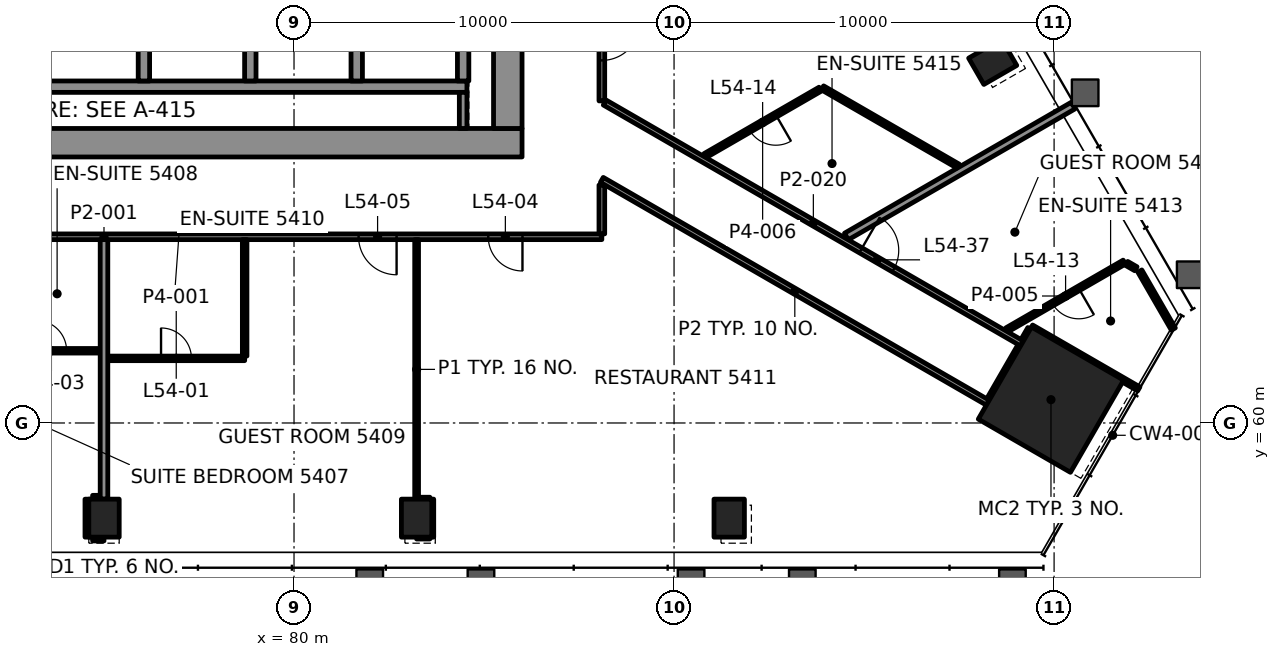
"""IFC4 building model, lengths in metres.
Left out: names, types, materials, properties, quantities, classifications, styles, units other than length and angle.
Written with IfcOpenShell. Run it as: python <this file> out.ifc"""

import sys

from ifc_helpers import new_model, si_unit, direction, frame, frame_2d, origin, origin_2d, place, context, subcontext, project, spatial, rectangle, hollow_rectangle, extrude, element, fill, save


model = new_model("IFC4")
c1 = context("Model", 3, precision=1e-05, world=origin(), true_north=direction((0.0, 1.0)))
c2 = subcontext(c1, "Body", "Model", "MODEL_VIEW")
j1 = project(units=[si_unit("LENGTHUNIT", "METRE"), si_unit("PLANEANGLEUNIT", "RADIAN")], contexts=[c1])
p1 = place(None, origin())
s1 = spatial("IfcSite", under=j1, at=p1, CompositionType="ELEMENT")
p2 = place(p1, origin())
s2 = spatial("IfcBuilding", under=s1, at=p2, CompositionType="ELEMENT")
p3 = place(p2, frame((0.0, 0.0, 229.9)))
s3 = spatial("IfcBuildingStorey", under=s2, at=p3, CompositionType="ELEMENT", Elevation=229.9)
p4 = place(p3, frame((99.918, 60.614, 0.0), z_axis=(0.0, 0.0, 1.0), x_axis=(0.5, 0.866025403784, 0.0)))
e1 = element("IfcColumn", 1, at=p4, inside=s3, PredefinedType="COLUMN", context=c2, shape_type="SweptSolid", body=[
    extrude(rectangle(XDim=2.8, YDim=2.8, at=origin_2d()), origin(), (0.0, 0.0, 1.0), 3.9),
])
for number, where, z_axis, x_axis in (
    (2, (75.0, 57.496, -0.0), (0.0, 0.0, 1.0), (1.0, 0.0, 0.0)),
    (3, (83.226, 57.496, -0.0), (0.0, 0.0, 1.0), (1.0, 0.0, 0.0)),
    (4, (91.451, 57.496, -0.0), (0.0, 0.0, 1.0), (1.0, 0.0, 0.0)),
    (5, (98.385, 69.505, -0.0), (0.0, 0.0, 1.0), (-0.5, 0.866, 0.0)),
):
    element("IfcColumn", number, at=place(p3, frame(where, z_axis=z_axis, x_axis=x_axis)), inside=s3, PredefinedType="COLUMN", context=c2, shape_type="SweptSolid", body=[
        extrude(hollow_rectangle(XDim=0.8, YDim=1.0, WallThickness=0.05, at=origin_2d()), origin(), (0.0, 0.0, 1.0), 3.9),
    ])
p5 = place(p3, frame((64.0, 67.375, 0.0), z_axis=(0.0, 0.0, 1.0), x_axis=(1.0, 0.0, 0.0)))
e6 = element("IfcWall", 6, at=p5, inside=s3, PredefinedType="SHEAR", context=c2, shape_type="SweptSolid", body=[
    extrude(rectangle(XDim=22.0, YDim=0.75, at=frame_2d((11.0, 0.0))), origin(), (0.0, 0.0, 1.0), 3.7),
])
p6 = place(p5, frame((1.575, 0.0, 0.0)))
e7 = element("IfcOpeningElement", 7, at=p6, cuts=e6, PredefinedType="OPENING", context=c2, shape_type="SweptSolid", body=[
    extrude(rectangle(XDim=0.9, YDim=2.1, at=frame_2d((0.45, 1.05))), frame((0.0, 0.385, 0.0), z_axis=(0.0, -1.0, 0.0), x_axis=(1.0, 0.0, 0.0)), (0.0, 0.0, 1.0), 0.77),
])
p7 = place(p5, frame((4.425, 0.0, 0.0)))
e8 = element("IfcOpeningElement", 8, at=p7, cuts=e6, PredefinedType="OPENING", context=c2, shape_type="SweptSolid", body=[
    extrude(rectangle(XDim=0.9, YDim=2.1, at=frame_2d((0.45, 1.05))), frame((0.0, 0.385, 0.0), z_axis=(0.0, -1.0, 0.0), x_axis=(1.0, 0.0, 0.0)), (0.0, 0.0, 1.0), 0.77),
])
p8 = place(p3, frame((85.625, 67.75, 0.0), z_axis=(0.0, 0.0, 1.0), x_axis=(0.0, 1.0, 0.0)))
e9 = element("IfcWall", 9, at=p8, inside=s3, PredefinedType="SHEAR", context=c2, shape_type="SweptSolid", body=[
    extrude(rectangle(XDim=14.5, YDim=0.75, at=frame_2d((7.25, 0.0))), origin(), (0.0, 0.0, 1.0), 3.7),
])
p9 = place(p8, frame((4.65, 0.0, 0.0)))
e10 = element("IfcOpeningElement", 10, at=p9, cuts=e9, PredefinedType="OPENING", context=c2, shape_type="SweptSolid", body=[
    extrude(rectangle(XDim=1.8, YDim=2.1, at=frame_2d((0.9, 1.05))), frame((0.0, 0.385, 0.0), z_axis=(0.0, -1.0, 0.0), x_axis=(1.0, 0.0, 0.0)), (0.0, 0.0, 1.0), 0.77),
])
p10 = place(p8, frame((11.8, 0.0, 0.0)))
e11 = element("IfcOpeningElement", 11, at=p10, cuts=e9, PredefinedType="OPENING", context=c2, shape_type="SweptSolid", body=[
    extrude(rectangle(XDim=0.9, YDim=2.1, at=frame_2d((0.45, 1.05))), frame((0.0, 0.385, 0.0), z_axis=(0.0, -1.0, 0.0), x_axis=(1.0, 0.0, 0.0)), (0.0, 0.0, 1.0), 0.77),
])
p11 = place(p3, frame((70.35, 68.85, 0.0), z_axis=(0.0, 0.0, 1.0), x_axis=(1.0, 0.0, 0.0)))
e12 = element("IfcWall", 12, at=p11, inside=s3, PredefinedType="SHEAR", context=c2, shape_type="SweptSolid", body=[
    extrude(rectangle(XDim=14.2, YDim=0.3, at=frame_2d((7.1, 0.0))), origin(), (0.0, 0.0, 1.0), 3.7),
])
for number, where, z_axis, x_axis in (
    (13, (76.05, 69.0, 0.0), (0.0, 0.0, 1.0), (0.0, 1.0, 0.0)),
    (14, (78.85, 69.0, 0.0), (0.0, 0.0, 1.0), (0.0, 1.0, 0.0)),
    (15, (81.65, 69.0, 0.0), (0.0, 0.0, 1.0), (0.0, 1.0, 0.0)),
    (16, (84.45, 69.0, 0.0), (0.0, 0.0, 1.0), (0.0, 1.0, 0.0)),
):
    element("IfcWall", number, at=place(p3, frame(where, z_axis=z_axis, x_axis=x_axis)), inside=s3, PredefinedType="SHEAR", context=c2, shape_type="SweptSolid", body=[
        extrude(rectangle(XDim=2.6, YDim=0.3, at=frame_2d((1.3, 0.0))), origin(), (0.0, 0.0, 1.0), 3.7),
    ])
p12 = place(p3, frame((74.7, 56.996, 0.0), z_axis=(0.0, 0.0, 1.0), x_axis=(1.0, 0.0, 0.0)))
e17 = element("IfcWall", 17, at=p12, inside=s3, PredefinedType="PARTITIONING", context=c2, shape_type="SweptSolid", body=[
    extrude(rectangle(XDim=0.299, YDim=0.2, at=frame_2d((0.149, 0.0))), origin(), (0.0, 0.0, 1.0), 3.1),
])
p13 = place(p3, frame((83.226, 56.996, 0.0), z_axis=(0.0, 0.0, 1.0), x_axis=(1.0, 0.0, 0.0)))
e18 = element("IfcWall", 18, at=p13, inside=s3, PredefinedType="PARTITIONING", context=c2, shape_type="SweptSolid", body=[
    extrude(rectangle(XDim=0.349, YDim=0.1, at=frame_2d((0.175, 0.0))), origin(), (0.0, 0.0, 1.0), 3.1),
])
p14 = place(p3, frame((74.7, 57.996, 0.0), z_axis=(0.0, 0.0, 1.0), x_axis=(1.0, 0.0, 0.0)))
e19 = element("IfcWall", 19, at=p14, inside=s3, PredefinedType="PARTITIONING", context=c2, shape_type="SweptSolid", body=[
    extrude(rectangle(XDim=0.199, YDim=0.2, at=frame_2d((0.1, 0.0))), origin(), (0.0, 0.0, 1.0), 3.1),
])
p15 = place(p3, frame((83.286, 57.996, 0.0), z_axis=(0.0, 0.0, 1.0), x_axis=(1.0, 0.0, 0.0)))
e20 = element("IfcWall", 20, at=p15, inside=s3, PredefinedType="PARTITIONING", context=c2, shape_type="SweptSolid", body=[
    extrude(rectangle(XDim=0.289, YDim=0.1, at=frame_2d((0.145, 0.0))), origin(), (0.0, 0.0, 1.0), 3.1),
])
p16 = place(p3, frame((75.1, 61.7, 0.0), z_axis=(0.0, 0.0, 1.0), x_axis=(1.0, 0.0, 0.0)))
e21 = element("IfcWall", 21, at=p16, inside=s3, PredefinedType="PARTITIONING", context=c2, shape_type="SweptSolid", body=[
    extrude(rectangle(XDim=3.601, YDim=0.12, at=frame_2d((1.801, 0.0))), origin(), (0.0, 0.0, 1.0), 3.1),
])
p17 = place(p16, frame((1.401, 0.0, 0.0)))
e22 = element("IfcOpeningElement", 22, at=p17, cuts=e21, PredefinedType="OPENING", context=c2, shape_type="SweptSolid", body=[
    extrude(rectangle(XDim=0.8, YDim=2.1, at=frame_2d((0.4, 1.05))), frame((0.0, 0.07, 0.0), z_axis=(0.0, -1.0, 0.0), x_axis=(1.0, 0.0, 0.0)), (0.0, 0.0, 1.0), 0.14),
])
p18 = place(p3, frame((71.77, 61.9, 0.0), z_axis=(0.0, 0.0, 1.0), x_axis=(1.0, 0.0, 0.0)))
e23 = element("IfcWall", 23, at=p18, inside=s3, PredefinedType="PARTITIONING", context=c2, shape_type="SweptSolid", body=[
    extrude(rectangle(XDim=3.13, YDim=0.12, at=frame_2d((1.565, 0.0))), origin(), (0.0, 0.0, 1.0), 3.1),
])
p19 = place(p18, frame((1.446, 0.0, 0.0)))
e24 = element("IfcOpeningElement", 24, at=p19, cuts=e23, PredefinedType="OPENING", context=c2, shape_type="SweptSolid", body=[
    extrude(rectangle(XDim=0.8, YDim=2.1, at=frame_2d((0.4, 1.05))), frame((0.0, 0.07, 0.0), z_axis=(0.0, -1.0, 0.0), x_axis=(1.0, 0.0, 0.0)), (0.0, 0.0, 1.0), 0.14),
])
p20 = place(p3, frame((88.099, 64.9, 0.0), z_axis=(0.0, 0.0, 1.0), x_axis=(-1.0, 0.0, 0.0)))
e25 = element("IfcWall", 25, at=p20, inside=s3, PredefinedType="PARTITIONING", context=c2, shape_type="SweptSolid", body=[
    extrude(rectangle(XDim=26.199, YDim=0.15, at=frame_2d((13.1, 0.0))), origin(), (0.0, 0.0, 1.0), 3.1),
])
p21 = place(p20, frame((2.088, 0.0, 0.0)))
e26 = element("IfcOpeningElement", 26, at=p21, cuts=e25, PredefinedType="OPENING", context=c2, shape_type="SweptSolid", body=[
    extrude(rectangle(XDim=0.9, YDim=2.1, at=frame_2d((0.45, 1.05))), frame((0.0, 0.085, 0.0), z_axis=(0.0, -1.0, 0.0), x_axis=(1.0, 0.0, 0.0)), (0.0, 0.0, 1.0), 0.17),
])
p22 = place(p20, frame((5.4, 0.0, 0.0)))
e27 = element("IfcOpeningElement", 27, at=p22, cuts=e25, PredefinedType="OPENING", context=c2, shape_type="SweptSolid", body=[
    extrude(rectangle(XDim=1.0, YDim=2.1, at=frame_2d((0.5, 1.05))), frame((0.0, 0.085, 0.0), z_axis=(0.0, -1.0, 0.0), x_axis=(1.0, 0.0, 0.0)), (0.0, 0.0, 1.0), 0.17),
])
p23 = place(p20, frame((17.946, 0.0, 0.0)))
e28 = element("IfcOpeningElement", 28, at=p23, cuts=e25, PredefinedType="OPENING", context=c2, shape_type="SweptSolid", body=[
    extrude(rectangle(XDim=1.0, YDim=2.1, at=frame_2d((0.5, 1.05))), frame((0.0, 0.085, 0.0), z_axis=(0.0, -1.0, 0.0), x_axis=(1.0, 0.0, 0.0)), (0.0, 0.0, 1.0), 0.17),
])
p24 = place(p20, frame((24.395, 0.0, 0.0)))
e29 = element("IfcOpeningElement", 29, at=p24, cuts=e25, PredefinedType="OPENING", context=c2, shape_type="SweptSolid", body=[
    extrude(rectangle(XDim=1.0, YDim=2.1, at=frame_2d((0.5, 1.05))), frame((0.0, 0.085, 0.0), z_axis=(0.0, -1.0, 0.0), x_axis=(1.0, 0.0, 0.0)), (0.0, 0.0, 1.0), 0.17),
])
p25 = place(p3, frame((101.848, 64.234, 0.0), z_axis=(0.0, 0.0, 1.0), x_axis=(-0.865998731726, -0.500046194516, 0.0)))
e30 = element("IfcWall", 30, at=p25, inside=s3, PredefinedType="PARTITIONING", context=c2, shape_type="SweptSolid", body=[
    extrude(rectangle(XDim=3.569, YDim=0.12, at=frame_2d((1.784, 0.0))), origin(), (0.0, 0.0, 1.0), 3.1),
])
p26 = place(p25, frame((1.384, 0.0, 0.0)))
e31 = element("IfcOpeningElement", 31, at=p26, cuts=e30, PredefinedType="OPENING", context=c2, shape_type="SweptSolid", body=[
    extrude(rectangle(XDim=0.8, YDim=2.1, at=frame_2d((0.4, 1.05))), frame((0.0, 0.07, 0.0), z_axis=(0.0, -1.0, 0.0), x_axis=(1.0, 0.0, 0.0)), (0.0, 0.0, 1.0), 0.14),
])
p27 = place(p3, frame((94.535, 64.907, 0.0), z_axis=(0.0, 0.0, 1.0), x_axis=(0.866022205013, 0.500005540394, 0.0)))
e32 = element("IfcWall", 32, at=p27, inside=s3, PredefinedType="PARTITIONING", context=c2, shape_type="SweptSolid", body=[
    extrude(rectangle(XDim=6.893, YDim=0.2, at=frame_2d((3.447, 0.0))), origin(), (0.0, 0.0, 1.0), 3.1),
])
p28 = place(p3, frame((93.846, 68.784, 0.0), z_axis=(0.0, 0.0, 1.0), x_axis=(-0.865997352085, -0.500048583822, 0.0)))
e33 = element("IfcWall", 33, at=p28, inside=s3, PredefinedType="PARTITIONING", context=c2, shape_type="SweptSolid", body=[
    extrude(rectangle(XDim=3.499, YDim=0.12, at=frame_2d((1.75, 0.0))), origin(), (0.0, 0.0, 1.0), 3.1),
])
p29 = place(p28, frame((1.35, 0.0, 0.0)))
e34 = element("IfcOpeningElement", 34, at=p29, cuts=e33, PredefinedType="OPENING", context=c2, shape_type="SweptSolid", body=[
    extrude(rectangle(XDim=0.8, YDim=2.1, at=frame_2d((0.4, 1.05))), frame((0.0, 0.07, 0.0), z_axis=(0.0, -1.0, 0.0), x_axis=(1.0, 0.0, 0.0)), (0.0, 0.0, 1.0), 0.14),
])
p30 = place(p3, frame((98.293, 60.6, 0.0), z_axis=(0.0, 0.0, 1.0), x_axis=(0.499927431592, 0.866067297121, 0.0)))
e35 = element("IfcWall", 35, at=p30, inside=s3, PredefinedType="PARTITIONING", context=c2, shape_type="SweptSolid", body=[
    extrude(rectangle(XDim=1.65, YDim=0.15, at=frame_2d((0.825, 0.0))), origin(), (0.0, 0.0, 1.0), 2.947),
])
p31 = place(p3, frame((88.1, 64.976, 0.0), z_axis=(0.0, 0.0, 1.0), x_axis=(0.0, 1.0, 0.0)))
e36 = element("IfcWall", 36, at=p31, inside=s3, PredefinedType="PARTITIONING", context=c2, shape_type="SweptSolid", body=[
    extrude(rectangle(XDim=1.285, YDim=0.15, at=frame_2d((0.643, 0.0))), origin(), (0.0, 0.0, 1.0), 2.947),
])
p32 = place(p3, frame((88.1, 85.1, 0.0), z_axis=(0.0, 0.0, 1.0), x_axis=(0.0, -1.0, 0.0)))
e37 = element("IfcWall", 37, at=p32, inside=s3, PredefinedType="PARTITIONING", context=c2, shape_type="SweptSolid", body=[
    extrude(rectangle(XDim=16.624, YDim=0.15, at=frame_2d((8.312, 0.0))), origin(), (0.0, 0.0, 1.0), 3.1),
])
p33 = place(p32, frame((5.542, 0.0, 0.0)))
e38 = element("IfcOpeningElement", 38, at=p33, cuts=e37, PredefinedType="OPENING", context=c2, shape_type="SweptSolid", body=[
    extrude(rectangle(XDim=1.0, YDim=2.1, at=frame_2d((0.5, 1.05))), frame((0.0, 0.085, 0.0), z_axis=(0.0, -1.0, 0.0), x_axis=(1.0, 0.0, 0.0)), (0.0, 0.0, 1.0), 0.17),
])
p34 = place(p32, frame((14.558, 0.0, 0.0)))
e39 = element("IfcOpeningElement", 39, at=p34, cuts=e37, PredefinedType="OPENING", context=c2, shape_type="SweptSolid", body=[
    extrude(rectangle(XDim=1.0, YDim=2.1, at=frame_2d((0.5, 1.05))), frame((0.0, 0.085, 0.0), z_axis=(0.0, -1.0, 0.0), x_axis=(1.0, 0.0, 0.0)), (0.0, 0.0, 1.0), 0.17),
])
p35 = place(p3, frame((83.626, 56.997, 0.0), z_axis=(0.0, 0.0, 1.0), x_axis=(0.0, 1.0, 0.0)))
e40 = element("IfcWall", 40, at=p35, inside=s3, PredefinedType="PARTITIONING", context=c2, shape_type="SweptSolid", body=[
    extrude(rectangle(XDim=0.999, YDim=0.1, at=frame_2d((0.5, 0.0))), origin(), (0.0, 0.0, 1.0), 3.022),
])
p36 = place(p3, frame((83.226, 57.996, 0.0), z_axis=(0.0, 0.0, 1.0), x_axis=(0.0, 1.0, 0.0)))
e41 = element("IfcWall", 41, at=p36, inside=s3, PredefinedType="PARTITIONING", context=c2, shape_type="SweptSolid", body=[
    extrude(rectangle(XDim=6.829, YDim=0.1, at=frame_2d((3.415, 0.0))), origin(), (0.0, 0.0, 1.0), 3.1),
])
p37 = place(p3, frame((78.701, 61.76, 0.0), z_axis=(0.0, 0.0, 1.0), x_axis=(0.0, 1.0, 0.0)))
e42 = element("IfcWall", 42, at=p37, inside=s3, PredefinedType="PARTITIONING", context=c2, shape_type="SweptSolid", body=[
    extrude(rectangle(XDim=3.065, YDim=0.12, at=frame_2d((1.532, 0.0))), origin(), (0.0, 0.0, 1.0), 3.1),
])
p38 = place(p3, frame((75.0, 57.997, 0.0), z_axis=(0.0, 0.0, 1.0), x_axis=(0.0, 1.0, 0.0)))
e43 = element("IfcWall", 43, at=p38, inside=s3, PredefinedType="PARTITIONING", context=c2, shape_type="SweptSolid", body=[
    extrude(rectangle(XDim=6.828, YDim=0.2, at=frame_2d((3.414, 0.0))), origin(), (0.0, 0.0, 1.0), 3.1),
])
p39 = place(p3, frame((74.6, 56.997, 0.0), z_axis=(0.0, 0.0, 1.0), x_axis=(0.0, 1.0, 0.0)))
e44 = element("IfcWall", 44, at=p39, inside=s3, PredefinedType="PARTITIONING", context=c2, shape_type="SweptSolid", body=[
    extrude(rectangle(XDim=0.999, YDim=0.2, at=frame_2d((0.5, 0.0))), origin(), (0.0, 0.0, 1.0), 3.022),
])
p40 = place(p3, frame((103.138, 62.471, 0.0), z_axis=(0.0, 0.0, 1.0), x_axis=(-0.499998282143, 0.866026395587, 0.0)))
e45 = element("IfcWall", 45, at=p40, inside=s3, PredefinedType="PARTITIONING", context=c2, shape_type="SweptSolid", body=[
    extrude(rectangle(XDim=1.762, YDim=0.12, at=frame_2d((0.881, 0.0))), origin(), (0.0, 0.0, 1.0), 3.1),
])
p41 = place(p3, frame((102.153, 64.058, 0.0), z_axis=(0.0, 0.0, 1.0), x_axis=(-0.866113839764, 0.499846793097, 0.0)))
e46 = element("IfcWall", 46, at=p41, inside=s3, PredefinedType="PARTITIONING", context=c2, shape_type="SweptSolid", body=[
    extrude(rectangle(XDim=0.283, YDim=0.12, at=frame_2d((0.142, 0.0))), origin(), (0.0, 0.0, 1.0), 3.1),
])
p42 = place(p3, frame((97.473, 66.76, 0.0), z_axis=(0.0, 0.0, 1.0), x_axis=(-0.866027647951, 0.499996112969, 0.0)))
e47 = element("IfcWall", 47, at=p42, inside=s3, PredefinedType="PARTITIONING", context=c2, shape_type="SweptSolid", body=[
    extrude(rectangle(XDim=4.119, YDim=0.12, at=frame_2d((2.059, 0.0))), origin(), (0.0, 0.0, 1.0), 3.1),
])
p43 = place(p3, frame((102.229, 60.896, 0.0), z_axis=(0.0, 0.0, 1.0), x_axis=(-0.866054628924, 0.499949377157, 0.0)))
e48 = element("IfcWall", 48, at=p43, inside=s3, PredefinedType="PARTITIONING", context=c2, shape_type="SweptSolid", body=[
    extrude(rectangle(XDim=3.26, YDim=0.12, at=frame_2d((1.63, 0.0))), origin(), (0.0, 0.0, 1.0), 3.1),
])
p44 = place(p3, frame((88.175, 68.433, 0.0), z_axis=(0.0, 0.0, 1.0), x_axis=(0.866028141608, -0.499995257921, 0.0)))
e49 = element("IfcWall", 49, at=p44, inside=s3, PredefinedType="PARTITIONING", context=c2, shape_type="SweptSolid", body=[
    extrude(rectangle(XDim=12.679, YDim=0.15, at=frame_2d((6.339, 0.0))), origin(), (0.0, 0.0, 1.0), 3.1),
])
p45 = place(p44, frame((7.779, 0.0, 0.0)))
e50 = element("IfcOpeningElement", 50, at=p45, cuts=e49, PredefinedType="OPENING", context=c2, shape_type="SweptSolid", body=[
    extrude(rectangle(XDim=1.0, YDim=2.1, at=frame_2d((0.5, 1.05))), frame((0.0, 0.085, 0.0), z_axis=(0.0, -1.0, 0.0), x_axis=(1.0, 0.0, 0.0)), (0.0, 0.0, 1.0), 0.17),
])
p46 = place(p3, frame((98.255, 60.535, 0.0), z_axis=(0.0, 0.0, 1.0), x_axis=(-0.866028172479, 0.49999520445, 0.0)))
e51 = element("IfcWall", 51, at=p46, inside=s3, PredefinedType="PARTITIONING", context=c2, shape_type="SweptSolid", body=[
    extrude(rectangle(XDim=11.726, YDim=0.15, at=frame_2d((5.863, 0.0))), origin(), (0.0, 0.0, 1.0), 2.947),
])
p47 = place(p3, frame((99.192, 62.158, 0.0), z_axis=(0.0, 0.0, 1.0), x_axis=(0.500534336868, 0.865716684381, 0.0)))
e52 = element("IfcWall", 52, at=p47, inside=s3, PredefinedType="PARTITIONING", context=c2, shape_type="SweptSolid", body=[
    extrude(rectangle(XDim=0.364, YDim=0.15, at=frame_2d((0.182, 0.0))), origin(), (0.0, 0.0, 1.0), 3.1),
])
p48 = place(p3, frame((84.45, 67.75, 0.0), z_axis=(0.0, 0.0, 1.0), x_axis=(0.0, 1.0, 0.0)))
e53 = element("IfcWall", 53, at=p48, inside=s3, PredefinedType="PARTITIONING", context=c2, shape_type="SweptSolid", body=[
    extrude(rectangle(XDim=0.95, YDim=0.2, at=frame_2d((0.475, 0.0))), origin(), (0.0, 0.0, 1.0), 3.7),
])
p49 = place(p17, origin())
e54 = element("IfcDoor", 54, at=p49, inside=s3, OperationType="SINGLE_SWING_LEFT", PredefinedType="DOOR", context=c2, shape_type="SweptSolid", body=[
    extrude(rectangle(XDim=0.8, YDim=2.1, at=frame_2d((0.4, 1.05))), frame((0.0, 0.025, 0.0), z_axis=(0.0, -1.0, 0.0), x_axis=(1.0, 0.0, 0.0)), (0.0, 0.0, 1.0), 0.05),
])
fill(e22, e54)
p50 = place(p19, origin())
e55 = element("IfcDoor", 55, at=p50, inside=s3, OperationType="SINGLE_SWING_LEFT", PredefinedType="DOOR", context=c2, shape_type="SweptSolid", body=[
    extrude(rectangle(XDim=0.8, YDim=2.1, at=frame_2d((0.4, 1.05))), frame((0.0, 0.025, 0.0), z_axis=(0.0, -1.0, 0.0), x_axis=(1.0, 0.0, 0.0)), (0.0, 0.0, 1.0), 0.05),
])
fill(e24, e55)
p51 = place(p21, origin())
e56 = element("IfcDoor", 56, at=p51, inside=s3, OperationType="SINGLE_SWING_LEFT", PredefinedType="DOOR", context=c2, shape_type="SweptSolid", body=[
    extrude(rectangle(XDim=0.9, YDim=2.1, at=frame_2d((0.45, 1.05))), frame((0.0, 0.025, 0.0), z_axis=(0.0, -1.0, 0.0), x_axis=(1.0, 0.0, 0.0)), (0.0, 0.0, 1.0), 0.05),
])
fill(e26, e56)
p52 = place(p22, origin())
e57 = element("IfcDoor", 57, at=p52, inside=s3, OperationType="SINGLE_SWING_LEFT", PredefinedType="DOOR", context=c2, shape_type="SweptSolid", body=[
    extrude(rectangle(XDim=1.0, YDim=2.1, at=frame_2d((0.5, 1.05))), frame((0.0, 0.025, 0.0), z_axis=(0.0, -1.0, 0.0), x_axis=(1.0, 0.0, 0.0)), (0.0, 0.0, 1.0), 0.05),
])
fill(e27, e57)
p53 = place(p26, origin())
e58 = element("IfcDoor", 58, at=p53, inside=s3, OperationType="SINGLE_SWING_LEFT", PredefinedType="DOOR", context=c2, shape_type="SweptSolid", body=[
    extrude(rectangle(XDim=0.8, YDim=2.1, at=frame_2d((0.4, 1.05))), frame((0.0, 0.025, 0.0), z_axis=(0.0, -1.0, 0.0), x_axis=(1.0, 0.0, 0.0)), (0.0, 0.0, 1.0), 0.05),
])
fill(e31, e58)
p54 = place(p29, origin())
e59 = element("IfcDoor", 59, at=p54, inside=s3, OperationType="SINGLE_SWING_LEFT", PredefinedType="DOOR", context=c2, shape_type="SweptSolid", body=[
    extrude(rectangle(XDim=0.8, YDim=2.1, at=frame_2d((0.4, 1.05))), frame((0.0, 0.025, 0.0), z_axis=(0.0, -1.0, 0.0), x_axis=(1.0, 0.0, 0.0)), (0.0, 0.0, 1.0), 0.05),
])
fill(e34, e59)
p55 = place(p34, origin())
e60 = element("IfcDoor", 60, at=p55, inside=s3, OperationType="SINGLE_SWING_RIGHT", PredefinedType="DOOR", context=c2, shape_type="SweptSolid", body=[
    extrude(rectangle(XDim=1.0, YDim=2.1, at=frame_2d((0.5, 1.05))), frame((0.0, 0.025, 0.0), z_axis=(0.0, -1.0, 0.0), x_axis=(1.0, 0.0, 0.0)), (0.0, 0.0, 1.0), 0.05),
])
fill(e39, e60)
p56 = place(p45, origin())
e61 = element("IfcDoor", 61, at=p56, inside=s3, OperationType="SINGLE_SWING_RIGHT", PredefinedType="DOOR", context=c2, shape_type="SweptSolid", body=[
    extrude(rectangle(XDim=1.0, YDim=2.1, at=frame_2d((0.5, 1.05))), frame((0.0, 0.025, 0.0), z_axis=(0.0, -1.0, 0.0), x_axis=(1.0, 0.0, 0.0)), (0.0, 0.0, 1.0), 0.05),
])
fill(e50, e61)
p57 = place(p3, origin())
p58 = place(p57, frame((86.027, 56.191, 0.15), z_axis=(0.0, 0.0, 1.0), x_axis=(1.0, 0.0, 0.0)))
p59 = place(p58, origin())
e62 = element("IfcWindow", 62, at=p59, inside=s3, PartitioningType="SINGLE_PANEL", PredefinedType="WINDOW", context=c2, shape_type="SweptSolid", body=[
    extrude(rectangle(XDim=2.667, YDim=3.55, at=frame_2d((1.333, 1.775))), frame((0.0, 0.03, 0.0), z_axis=(0.0, -1.0, 0.0), x_axis=(1.0, 0.0, 0.0)), (0.0, 0.0, 1.0), 0.06),
])
p60 = place(p57, frame((102.256, 65.41, 0.15), z_axis=(0.0, 0.0, 1.0), x_axis=(-0.5, 0.866025, 0.0)))
p61 = place(p60, origin())
e63 = element("IfcWindow", 63, at=p61, inside=s3, PartitioningType="SINGLE_PANEL", PredefinedType="WINDOW", context=c2, shape_type="SweptSolid", body=[
    extrude(rectangle(XDim=2.667, YDim=3.55, at=frame_2d((1.333, 1.775))), frame((0.0, 0.03, 0.0), z_axis=(0.0, -1.0, 0.0), x_axis=(1.0, 0.0, 0.0)), (0.0, 0.0, 1.0), 0.06),
])
save(model, sys.argv[1])
